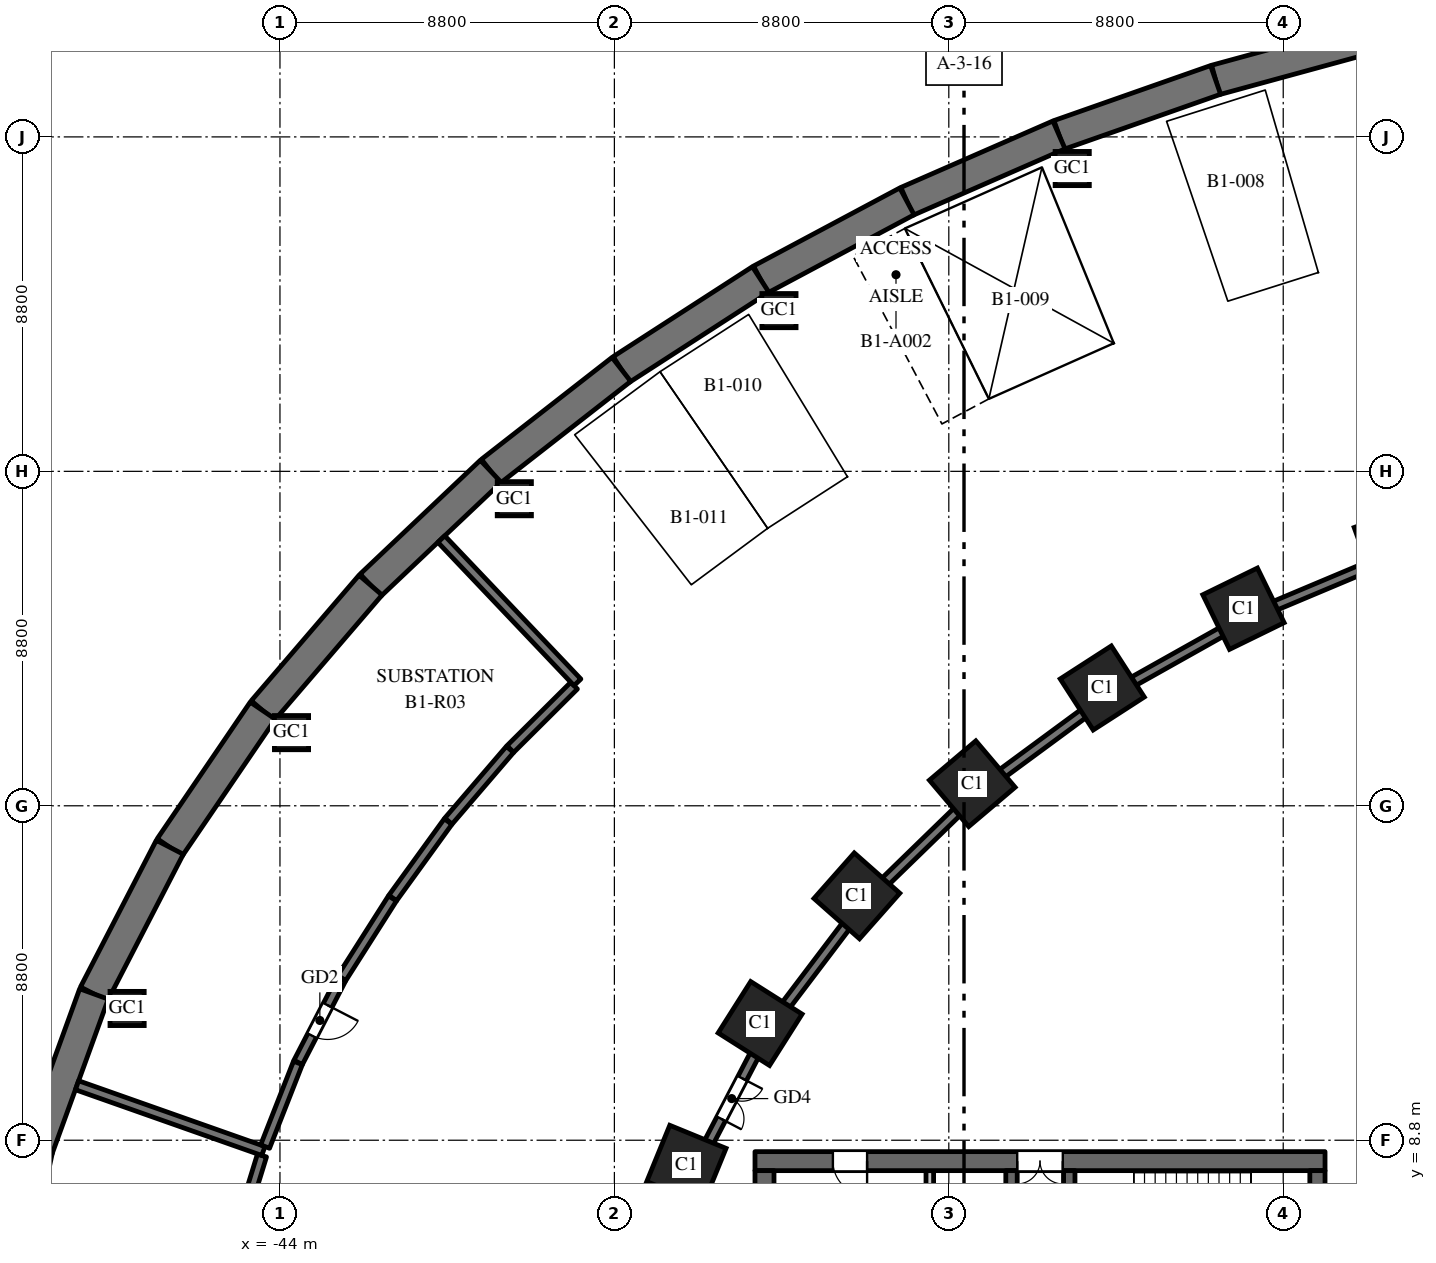
"""IFC4 building model, lengths in metres.
Left out: names, types, materials, properties, quantities, classifications, styles, units other than length and angle.
Written with IfcOpenShell. Run it as: python <this file> out.ifc"""

import sys

from ifc_helpers import new_model, si_unit, direction, frame, frame_2d, origin, origin_2d, place, context, subcontext, project, spatial, rectangle, hollow_rectangle, extrude, element, fill, save


model = new_model("IFC4")
c1 = context("Model", 3, precision=1e-05, world=origin(), true_north=direction((0.0, 1.0)))
c2 = subcontext(c1, "Body", "Model", "MODEL_VIEW")
j1 = project(units=[si_unit("LENGTHUNIT", "METRE"), si_unit("PLANEANGLEUNIT", "RADIAN")], contexts=[c1])
p1 = place(None, origin())
s1 = spatial("IfcSite", under=j1, at=p1, CompositionType="ELEMENT")
p2 = place(p1, origin())
s2 = spatial("IfcBuilding", under=s1, at=p2, CompositionType="ELEMENT")
p3 = place(p2, frame((0.0, 0.0, -4.2)))
s3 = spatial("IfcBuildingStorey", under=s2, at=p3, CompositionType="ELEMENT", Elevation=-4.2)
p4 = place(p3, frame((-15.165, 37.85, 0.0), z_axis=(0.0, 0.0, 1.0), x_axis=(-0.964679950239, -0.263424739931, 0.0)))
e1 = element("IfcWall", 1, at=p4, inside=s3, PredefinedType="SOLIDWALL", context=c2, shape_type="SweptSolid", body=[
    extrude(rectangle(XDim=4.369, YDim=0.8, at=frame_2d((2.185, 0.0))), origin(), (0.0, 0.0, 1.0), 3.85),
])
p5 = place(p3, frame((-19.379, 36.699, 0.0), z_axis=(0.0, 0.0, 1.0), x_axis=(-0.943526738033, -0.331296384853, 0.0)))
e2 = element("IfcWall", 2, at=p5, inside=s3, PredefinedType="SOLIDWALL", context=c2, shape_type="SweptSolid", body=[
    extrude(rectangle(XDim=4.368, YDim=0.8, at=frame_2d((2.184, 0.0))), origin(), (0.0, 0.0, 1.0), 3.85),
])
p6 = place(p3, frame((-23.5, 35.252, 0.0), z_axis=(0.0, 0.0, 1.0), x_axis=(-0.916336904548, -0.400408138483, 0.0)))
e3 = element("IfcWall", 3, at=p6, inside=s3, PredefinedType="SOLIDWALL", context=c2, shape_type="SweptSolid", body=[
    extrude(rectangle(XDim=4.366, YDim=0.8, at=frame_2d((2.183, 0.0))), origin(), (0.0, 0.0, 1.0), 3.85),
])
p7 = place(p3, frame((-27.501, 33.504, 0.0), z_axis=(0.0, 0.0, 1.0), x_axis=(-0.882159305704, -0.47095112205, 0.0)))
e4 = element("IfcWall", 4, at=p7, inside=s3, PredefinedType="SOLIDWALL", context=c2, shape_type="SweptSolid", body=[
    extrude(rectangle(XDim=4.365, YDim=0.8, at=frame_2d((2.182, 0.0))), origin(), (0.0, 0.0, 1.0), 3.85),
])
p8 = place(p3, frame((-31.352, 31.448, 0.0), z_axis=(0.0, 0.0, 1.0), x_axis=(-0.840047348843, -0.542513088969, 0.0)))
e5 = element("IfcWall", 5, at=p8, inside=s3, PredefinedType="SOLIDWALL", context=c2, shape_type="SweptSolid", body=[
    extrude(rectangle(XDim=4.362, YDim=0.8, at=frame_2d((2.181, 0.0))), origin(), (0.0, 0.0, 1.0), 3.85),
])
p9 = place(p3, frame((-35.016, 29.082, 0.0), z_axis=(0.0, 0.0, 1.0), x_axis=(-0.788491985196, -0.615045030288, 0.0)))
e6 = element("IfcWall", 6, at=p9, inside=s3, PredefinedType="SOLIDWALL", context=c2, shape_type="SweptSolid", body=[
    extrude(rectangle(XDim=4.359, YDim=0.8, at=frame_2d((2.18, 0.0))), origin(), (0.0, 0.0, 1.0), 3.85),
])
p10 = place(p3, frame((-38.453, 26.401, 0.0), z_axis=(0.0, 0.0, 1.0), x_axis=(-0.72620446032, -0.687478786444, 0.0)))
e7 = element("IfcWall", 7, at=p10, inside=s3, PredefinedType="SOLIDWALL", context=c2, shape_type="SweptSolid", body=[
    extrude(rectangle(XDim=4.356, YDim=0.8, at=frame_2d((2.178, 0.0))), origin(), (0.0, 0.0, 1.0), 3.85),
])
p11 = place(p3, frame((-41.617, 23.406, 0.0), z_axis=(0.0, 0.0, 1.0), x_axis=(-0.651387059497, -0.758745608699, 0.0)))
e8 = element("IfcWall", 8, at=p11, inside=s3, PredefinedType="SOLIDWALL", context=c2, shape_type="SweptSolid", body=[
    extrude(rectangle(XDim=4.353, YDim=0.8, at=frame_2d((2.176, 0.0))), origin(), (0.0, 0.0, 1.0), 3.85),
])
p12 = place(p3, frame((-44.452, 20.104, 0.0), z_axis=(0.0, 0.0, 1.0), x_axis=(-0.562667738859, -0.82668314102, 0.0)))
e9 = element("IfcWall", 9, at=p12, inside=s3, PredefinedType="SOLIDWALL", context=c2, shape_type="SweptSolid", body=[
    extrude(rectangle(XDim=4.349, YDim=0.8, at=frame_2d((2.174, 0.0))), origin(), (0.0, 0.0, 1.0), 3.85),
])
p13 = place(p3, frame((-46.899, 16.508, 0.0), z_axis=(0.0, 0.0, 1.0), x_axis=(-0.459242531468, -0.888310923771, 0.0)))
e10 = element("IfcWall", 10, at=p13, inside=s3, PredefinedType="SOLIDWALL", context=c2, shape_type="SweptSolid", body=[
    extrude(rectangle(XDim=4.345, YDim=0.8, at=frame_2d((2.172, 0.0))), origin(), (0.0, 0.0, 1.0), 3.85),
])
p14 = place(p3, frame((-48.894, 12.649, 0.0), z_axis=(0.0, 0.0, 1.0), x_axis=(-0.341286990045, -0.939959142956, 0.0)))
e11 = element("IfcWall", 11, at=p14, inside=s3, PredefinedType="SOLIDWALL", context=c2, shape_type="SweptSolid", body=[
    extrude(rectangle(XDim=4.342, YDim=0.8, at=frame_2d((2.171, 0.0))), origin(), (0.0, 0.0, 1.0), 3.85),
])
p15 = place(p3, frame((-50.376, 8.568, 0.0), z_axis=(0.0, 0.0, 1.0), x_axis=(-0.210616468766, -0.977568771537, 0.0)))
e12 = element("IfcWall", 12, at=p15, inside=s3, PredefinedType="SOLIDWALL", context=c2, shape_type="SweptSolid", body=[
    extrude(rectangle(XDim=4.339, YDim=0.8, at=frame_2d((2.169, 0.0))), origin(), (0.0, 0.0, 1.0), 3.85),
])
for number, where, z_axis, x_axis in (
    (13, (-14.709, 24.441, 0.0), (0.0, 0.0, 1.0), (-0.941, -0.338, 0.0)),
    (14, (-18.646, 22.785, 0.0), (0.0, 0.0, 1.0), (-0.898, -0.439, 0.0)),
    (15, (-22.362, 20.7, 0.0), (0.0, 0.0, 1.0), (-0.84, -0.542, 0.0)),
    (16, (-25.783, 18.18, 0.0), (0.0, 0.0, 1.0), (-0.763, -0.646, 0.0)),
    (17, (-28.819, 15.23, 0.0), (0.0, 0.0, 1.0), (-0.663, -0.749, 0.0)),
    (18, (-31.365, 11.871, 0.0), (0.0, 0.0, 1.0), (-0.535, -0.845, 0.0)),
    (19, (-33.305, 8.149, 0.0), (0.0, 0.0, 1.0), (-0.379, -0.925, 0.0)),
):
    element("IfcColumn", number, at=place(p3, frame(where, z_axis=z_axis, x_axis=x_axis)), inside=s3, PredefinedType="COLUMN", context=c2, shape_type="SweptSolid", body=[
        extrude(rectangle(XDim=1.6, YDim=1.6, at=origin_2d()), origin(), (0.0, 0.0, 1.0), 4.2),
    ])
p16 = place(p3, frame((-16.5, 8.25, 0.0), z_axis=(0.0, 0.0, 1.0), x_axis=(-1.0, 0.0, 0.0)))
e20 = element("IfcWall", 20, at=p16, inside=s3, PredefinedType="SHEAR", context=c2, shape_type="SweptSolid", body=[
    extrude(rectangle(XDim=15.0, YDim=0.5, at=frame_2d((7.5, 0.0))), origin(), (0.0, 0.0, 1.0), 3.85),
])
p17 = place(p16, frame((6.9, 0.0, 0.0)))
e21 = element("IfcOpeningElement", 21, at=p17, cuts=e20, PredefinedType="OPENING", context=c2, shape_type="SweptSolid", body=[
    extrude(rectangle(XDim=1.2, YDim=2.1, at=frame_2d((0.6, 1.05))), frame((0.0, 0.26, 0.0), z_axis=(0.0, -1.0, 0.0), x_axis=(1.0, 0.0, 0.0)), (0.0, 0.0, 1.0), 0.52),
])
p18 = place(p16, frame((12.05, 0.0, 0.0)))
e22 = element("IfcOpeningElement", 22, at=p18, cuts=e20, PredefinedType="OPENING", context=c2, shape_type="SweptSolid", body=[
    extrude(rectangle(XDim=0.9, YDim=2.1, at=frame_2d((0.45, 1.05))), frame((0.0, 0.26, 0.0), z_axis=(0.0, -1.0, 0.0), x_axis=(1.0, 0.0, 0.0)), (0.0, 0.0, 1.0), 0.52),
])
p19 = place(p3, frame((-24.75, -8.0, 0.0), z_axis=(0.0, 0.0, 1.0), x_axis=(0.0, 1.0, 0.0)))
e23 = element("IfcWall", 23, at=p19, inside=s3, PredefinedType="SHEAR", context=c2, shape_type="SweptSolid", body=[
    extrude(rectangle(XDim=16.0, YDim=0.3, at=frame_2d((8.0, 0.0))), origin(), (0.0, 0.0, 1.0), 3.85),
])
p20 = place(p19, frame((4.425, 0.0, 0.0)))
e24 = element("IfcOpeningElement", 24, at=p20, cuts=e23, PredefinedType="OPENING", context=c2, shape_type="SweptSolid", body=[
    extrude(rectangle(XDim=1.1, YDim=2.1, at=frame_2d((0.55, 1.05))), frame((0.0, 0.16, 0.0), z_axis=(0.0, -1.0, 0.0), x_axis=(1.0, 0.0, 0.0)), (0.0, 0.0, 1.0), 0.32),
])
p21 = place(p19, frame((7.45, 0.0, 0.0)))
e25 = element("IfcOpeningElement", 25, at=p21, cuts=e23, PredefinedType="OPENING", context=c2, shape_type="SweptSolid", body=[
    extrude(rectangle(XDim=1.1, YDim=2.1, at=frame_2d((0.55, 1.05))), frame((0.0, 0.16, 0.0), z_axis=(0.0, -1.0, 0.0), x_axis=(1.0, 0.0, 0.0)), (0.0, 0.0, 1.0), 0.32),
])
p22 = place(p19, frame((10.425, 0.0, 0.0)))
e26 = element("IfcOpeningElement", 26, at=p22, cuts=e23, PredefinedType="OPENING", context=c2, shape_type="SweptSolid", body=[
    extrude(rectangle(XDim=1.2, YDim=2.1, at=frame_2d((0.6, 1.05))), frame((0.0, 0.16, 0.0), z_axis=(0.0, -1.0, 0.0), x_axis=(1.0, 0.0, 0.0)), (0.0, 0.0, 1.0), 0.32),
])
p23 = place(p19, frame((13.75, 0.0, 0.0)))
e27 = element("IfcOpeningElement", 27, at=p23, cuts=e23, PredefinedType="OPENING", context=c2, shape_type="SweptSolid", body=[
    extrude(rectangle(XDim=0.9, YDim=2.1, at=frame_2d((0.45, 1.05))), frame((0.0, 0.16, 0.0), z_axis=(0.0, -1.0, 0.0), x_axis=(1.0, 0.0, 0.0)), (0.0, 0.0, 1.0), 0.32),
])
p24 = place(p19, frame((1.35, 0.0, 0.0)))
e28 = element("IfcOpeningElement", 28, at=p24, cuts=e23, PredefinedType="OPENING", context=c2, shape_type="SweptSolid", body=[
    extrude(rectangle(XDim=0.9, YDim=2.1, at=frame_2d((0.45, 1.05))), frame((0.0, 0.16, 0.0), z_axis=(0.0, -1.0, 0.0), x_axis=(1.0, 0.0, 0.0)), (0.0, 0.0, 1.0), 0.32),
])
p25 = place(p3, frame((-16.7, -8.0, 0.0), z_axis=(0.0, 0.0, 1.0), x_axis=(0.0, 1.0, 0.0)))
e29 = element("IfcWall", 29, at=p25, inside=s3, PredefinedType="SHEAR", context=c2, shape_type="SweptSolid", body=[
    extrude(rectangle(XDim=16.0, YDim=0.4, at=frame_2d((8.0, 0.0))), origin(), (0.0, 0.0, 1.0), 3.85),
])
p26 = place(p3, frame((-31.25, -8.0, 0.0), z_axis=(0.0, 0.0, 1.0), x_axis=(0.0, 1.0, 0.0)))
e30 = element("IfcWall", 30, at=p26, inside=s3, PredefinedType="SHEAR", context=c2, shape_type="SweptSolid", body=[
    extrude(rectangle(XDim=16.0, YDim=0.5, at=frame_2d((8.0, 0.0))), origin(), (0.0, 0.0, 1.0), 3.85),
])
p27 = place(p3, frame((-26.9, 4.75, 0.0), z_axis=(0.0, 0.0, 1.0), x_axis=(0.0, 1.0, 0.0)))
e31 = element("IfcWall", 31, at=p27, inside=s3, PredefinedType="PARTITIONING", context=c2, shape_type="SweptSolid", body=[
    extrude(rectangle(XDim=3.25, YDim=0.2, at=frame_2d((1.625, 0.0))), origin(), (0.0, 0.0, 1.0), 3.85),
])
p28 = place(p3, frame((-23.23, 2.25, 0.0), z_axis=(0.0, 0.0, 1.0), x_axis=(0.0, 1.0, 0.0)))
e32 = element("IfcWall", 32, at=p28, inside=s3, PredefinedType="SHEAR", context=c2, shape_type="SweptSolid", body=[
    extrude(rectangle(XDim=5.75, YDim=0.3, at=frame_2d((2.875, 0.0))), origin(), (0.0, 0.0, 1.0), 3.85),
])
p29 = place(p28, frame((0.6, 0.0, 0.0)))
e33 = element("IfcOpeningElement", 33, at=p29, cuts=e32, PredefinedType="OPENING", context=c2, shape_type="SweptSolid", body=[
    extrude(rectangle(XDim=1.0, YDim=2.1, at=frame_2d((0.5, 1.05))), frame((0.0, 0.16, 0.0), z_axis=(0.0, -1.0, 0.0), x_axis=(1.0, 0.0, 0.0)), (0.0, 0.0, 1.0), 0.32),
])
for number, where, z_axis, x_axis in (
    (34, (-23.153, 34.368, 0.0), (0.0, 0.0, 1.0), (1.0, 0.0, 0.0)),
    (35, (-30.869, 30.629, 0.0), (0.0, 0.0, 1.0), (1.0, 0.0, 0.0)),
    (36, (-37.833, 25.68, 0.0), (0.0, 0.0, 1.0), (1.0, 0.0, 0.0)),
    (37, (-43.696, 19.525, 0.0), (0.0, 0.0, 1.0), (1.0, 0.0, 0.0)),
    (38, (-48.022, 12.267, 0.0), (0.0, 0.0, 1.0), (1.0, 0.0, 0.0)),
):
    element("IfcColumn", number, at=place(p3, frame(where, z_axis=z_axis, x_axis=x_axis)), inside=s3, PredefinedType="COLUMN", context=c2, shape_type="SweptSolid", body=[
        extrude(hollow_rectangle(XDim=0.9, YDim=0.9, WallThickness=0.045, at=origin_2d()), origin(), (0.0, 0.0, 1.0), 4.2),
    ])
p30 = place(p3, frame((-44.473, 8.398, 0.0), z_axis=(0.0, 0.0, 1.0), x_axis=(-0.294819172462, -0.955553062655, 0.0)))
e39 = element("IfcWall", 39, at=p30, inside=s3, PredefinedType="SOLIDWALL", context=c2, shape_type="SweptSolid", body=[
    extrude(rectangle(XDim=2.363, YDim=0.25, at=frame_2d((1.181, 0.0))), origin(), (0.0, 0.0, 1.0), 3.85),
])
p31 = place(p3, frame((-44.437, 8.517, 0.0), z_axis=(0.0, 0.0, 1.0), x_axis=(-0.943071780523, 0.332589261374, 0.0)))
e40 = element("IfcWall", 40, at=p31, inside=s3, PredefinedType="SOLIDWALL", context=c2, shape_type="SweptSolid", body=[
    extrude(rectangle(XDim=5.2, YDim=0.25, at=frame_2d((2.6, 0.0))), origin(), (0.0, 0.0, 1.0), 3.25),
])
p32 = place(p3, frame((-36.261, 20.761, 0.0), z_axis=(0.0, 0.0, 1.0), x_axis=(-0.709013482925, -0.705194924138, 0.0)))
e41 = element("IfcWall", 41, at=p32, inside=s3, PredefinedType="SOLIDWALL", context=c2, shape_type="SweptSolid", body=[
    extrude(rectangle(XDim=2.366, YDim=0.25, at=frame_2d((1.183, 0.0))), origin(), (0.0, 0.0, 1.0), 3.85),
])
p33 = place(p3, frame((-37.948, 19.083, 0.0), z_axis=(0.0, 0.0, 1.0), x_axis=(-0.651349194993, -0.758778113932, 0.0)))
e42 = element("IfcWall", 42, at=p33, inside=s3, PredefinedType="SOLIDWALL", context=c2, shape_type="SweptSolid", body=[
    extrude(rectangle(XDim=2.486, YDim=0.25, at=frame_2d((1.243, 0.0))), origin(), (0.0, 0.0, 1.0), 2.85),
])
p34 = place(p3, frame((-39.576, 17.185, 0.0), z_axis=(0.0, 0.0, 1.0), x_axis=(-0.586703300203, -0.80980197427, 0.0)))
e43 = element("IfcWall", 43, at=p34, inside=s3, PredefinedType="SOLIDWALL", context=c2, shape_type="SweptSolid", body=[
    extrude(rectangle(XDim=2.483, YDim=0.25, at=frame_2d((1.241, 0.0))), origin(), (0.0, 0.0, 1.0), 3.85),
])
p35 = place(p3, frame((-41.04, 15.163, 0.0), z_axis=(0.0, 0.0, 1.0), x_axis=(-0.536780033941, -0.843722226306, 0.0)))
e44 = element("IfcWall", 44, at=p35, inside=s3, PredefinedType="SOLIDWALL", context=c2, shape_type="SweptSolid", body=[
    extrude(rectangle(XDim=2.482, YDim=0.25, at=frame_2d((1.241, 0.0))), origin(), (0.0, 0.0, 1.0), 3.85),
])
p36 = place(p3, frame((-42.38, 13.056, 0.0), z_axis=(0.0, 0.0, 1.0), x_axis=(-0.459310705797, -0.888275675419, 0.0)))
e45 = element("IfcWall", 45, at=p36, inside=s3, PredefinedType="SOLIDWALL", context=c2, shape_type="SweptSolid", body=[
    extrude(rectangle(XDim=2.486, YDim=0.25, at=frame_2d((1.243, 0.0))), origin(), (0.0, 0.0, 1.0), 2.85),
])
p37 = place(p36, frame((0.793, 0.0, 0.0)))
e46 = element("IfcOpeningElement", 46, at=p37, cuts=e45, PredefinedType="OPENING", context=c2, shape_type="SweptSolid", body=[
    extrude(rectangle(XDim=0.9, YDim=2.1, at=frame_2d((0.45, 1.05))), frame((0.0, 0.135, 0.0), z_axis=(0.0, -1.0, 0.0), x_axis=(1.0, 0.0, 0.0)), (0.0, 0.0, 1.0), 0.27),
])
p38 = place(p3, frame((-43.527, 10.835, 0.0), z_axis=(0.0, 0.0, 1.0), x_axis=(-0.365348921729, -0.930870649119, 0.0)))
e47 = element("IfcWall", 47, at=p38, inside=s3, PredefinedType="SOLIDWALL", context=c2, shape_type="SweptSolid", body=[
    extrude(rectangle(XDim=2.365, YDim=0.25, at=frame_2d((1.183, 0.0))), origin(), (0.0, 0.0, 1.0), 3.85),
])
p39 = place(p3, frame((-36.172, 20.849, 0.0), z_axis=(0.0, 0.0, 1.0), x_axis=(-0.688775374143, 0.724974816097, 0.0)))
e48 = element("IfcWall", 48, at=p39, inside=s3, PredefinedType="SOLIDWALL", context=c2, shape_type="SweptSolid", body=[
    extrude(rectangle(XDim=5.2, YDim=0.25, at=frame_2d((2.6, 0.0))), origin(), (0.0, 0.0, 1.0), 3.25),
])
p40 = place(p3, frame((-14.633, 24.202, 0.0), z_axis=(0.0, 0.0, 1.0), x_axis=(-0.921810386469, -0.387641085798, 0.0)))
e49 = element("IfcWall", 49, at=p40, inside=s3, PredefinedType="SOLIDWALL", context=c2, shape_type="SweptSolid", body=[
    extrude(rectangle(XDim=4.225, YDim=0.25, at=frame_2d((2.113, 0.0))), origin(), (0.0, 0.0, 1.0), 2.95),
])
p41 = place(p3, frame((-18.544, 22.556, 0.0), z_axis=(0.0, 0.0, 1.0), x_axis=(-0.872061015455, -0.489397165218, 0.0)))
e50 = element("IfcWall", 50, at=p41, inside=s3, PredefinedType="SOLIDWALL", context=c2, shape_type="SweptSolid", body=[
    extrude(rectangle(XDim=4.213, YDim=0.25, at=frame_2d((2.107, 0.0))), origin(), (0.0, 0.0, 1.0), 2.95),
])
p42 = place(p3, frame((-22.233, 20.484, 0.0), z_axis=(0.0, 0.0, 1.0), x_axis=(-0.805155221937, -0.593064135306, 0.0)))
e51 = element("IfcWall", 51, at=p42, inside=s3, PredefinedType="SOLIDWALL", context=c2, shape_type="SweptSolid", body=[
    extrude(rectangle(XDim=4.198, YDim=0.25, at=frame_2d((2.099, 0.0))), origin(), (0.0, 0.0, 1.0), 2.95),
])
p43 = place(p3, frame((-25.627, 17.983, 0.0), z_axis=(0.0, 0.0, 1.0), x_axis=(-0.717227656803, -0.696838925661, 0.0)))
e52 = element("IfcWall", 52, at=p43, inside=s3, PredefinedType="SOLIDWALL", context=c2, shape_type="SweptSolid", body=[
    extrude(rectangle(XDim=4.179, YDim=0.25, at=frame_2d((2.089, 0.0))), origin(), (0.0, 0.0, 1.0), 2.95),
])
p44 = place(p3, frame((-28.636, 15.057, 0.0), z_axis=(0.0, 0.0, 1.0), x_axis=(-0.604041965907, -0.796952510143, 0.0)))
e53 = element("IfcWall", 53, at=p44, inside=s3, PredefinedType="SOLIDWALL", context=c2, shape_type="SweptSolid", body=[
    extrude(rectangle(XDim=4.157, YDim=0.25, at=frame_2d((2.079, 0.0))), origin(), (0.0, 0.0, 1.0), 2.95),
])
p45 = place(p3, frame((-31.157, 11.729, 0.0), z_axis=(0.0, 0.0, 1.0), x_axis=(-0.462265314279, -0.886741664305, 0.0)))
e54 = element("IfcWall", 54, at=p45, inside=s3, PredefinedType="SOLIDWALL", context=c2, shape_type="SweptSolid", body=[
    extrude(rectangle(XDim=4.135, YDim=0.25, at=frame_2d((2.067, 0.0))), origin(), (0.0, 0.0, 1.0), 2.95),
])
p46 = place(p45, frame((1.467, 0.0, 0.0)))
e55 = element("IfcOpeningElement", 55, at=p46, cuts=e54, PredefinedType="OPENING", context=c2, shape_type="SweptSolid", body=[
    extrude(rectangle(XDim=1.2, YDim=2.1, at=frame_2d((0.6, 1.05))), frame((0.0, 0.135, 0.0), z_axis=(0.0, -1.0, 0.0), x_axis=(1.0, 0.0, 0.0)), (0.0, 0.0, 1.0), 0.27),
])
p47 = place(p3, frame((-33.075, 8.046, 0.0), z_axis=(0.0, 0.0, 1.0), x_axis=(-0.292171812712, -0.956365846241, 0.0)))
e56 = element("IfcWall", 56, at=p47, inside=s3, PredefinedType="SOLIDWALL", context=c2, shape_type="SweptSolid", body=[
    extrude(rectangle(XDim=4.115, YDim=0.25, at=frame_2d((2.058, 0.0))), origin(), (0.0, 0.0, 1.0), 2.95),
])
p48 = place(p17, origin())
e57 = element("IfcDoor", 57, at=p48, inside=s3, OperationType="DOUBLE_DOOR_DOUBLE_SWING", PredefinedType="DOOR", context=c2, shape_type="SweptSolid", body=[
    extrude(rectangle(XDim=1.2, YDim=2.1, at=frame_2d((0.6, 1.05))), frame((0.0, 0.025, 0.0), z_axis=(0.0, -1.0, 0.0), x_axis=(1.0, 0.0, 0.0)), (0.0, 0.0, 1.0), 0.05),
])
fill(e21, e57)
p49 = place(p18, origin())
e58 = element("IfcDoor", 58, at=p49, inside=s3, OperationType="SINGLE_SWING_RIGHT", PredefinedType="DOOR", context=c2, shape_type="SweptSolid", body=[
    extrude(rectangle(XDim=0.9, YDim=2.1, at=frame_2d((0.45, 1.05))), frame((0.0, 0.025, 0.0), z_axis=(0.0, -1.0, 0.0), x_axis=(1.0, 0.0, 0.0)), (0.0, 0.0, 1.0), 0.05),
])
fill(e22, e58)
p50 = place(p37, origin())
e59 = element("IfcDoor", 59, at=p50, inside=s3, OperationType="SINGLE_SWING_LEFT", PredefinedType="DOOR", context=c2, shape_type="SweptSolid", body=[
    extrude(rectangle(XDim=0.9, YDim=2.1, at=frame_2d((0.45, 1.05))), frame((0.0, 0.025, 0.0), z_axis=(0.0, -1.0, 0.0), x_axis=(1.0, 0.0, 0.0)), (0.0, 0.0, 1.0), 0.05),
])
fill(e46, e59)
p51 = place(p46, origin())
e60 = element("IfcDoor", 60, at=p51, inside=s3, OperationType="DOUBLE_DOOR_SINGLE_SWING", PredefinedType="DOOR", context=c2, shape_type="SweptSolid", body=[
    extrude(rectangle(XDim=1.2, YDim=2.1, at=frame_2d((0.6, 1.05))), frame((0.0, 0.025, 0.0), z_axis=(0.0, -1.0, 0.0), x_axis=(1.0, 0.0, 0.0)), (0.0, 0.0, 1.0), 0.05),
])
fill(e55, e60)
save(model, sys.argv[1])
